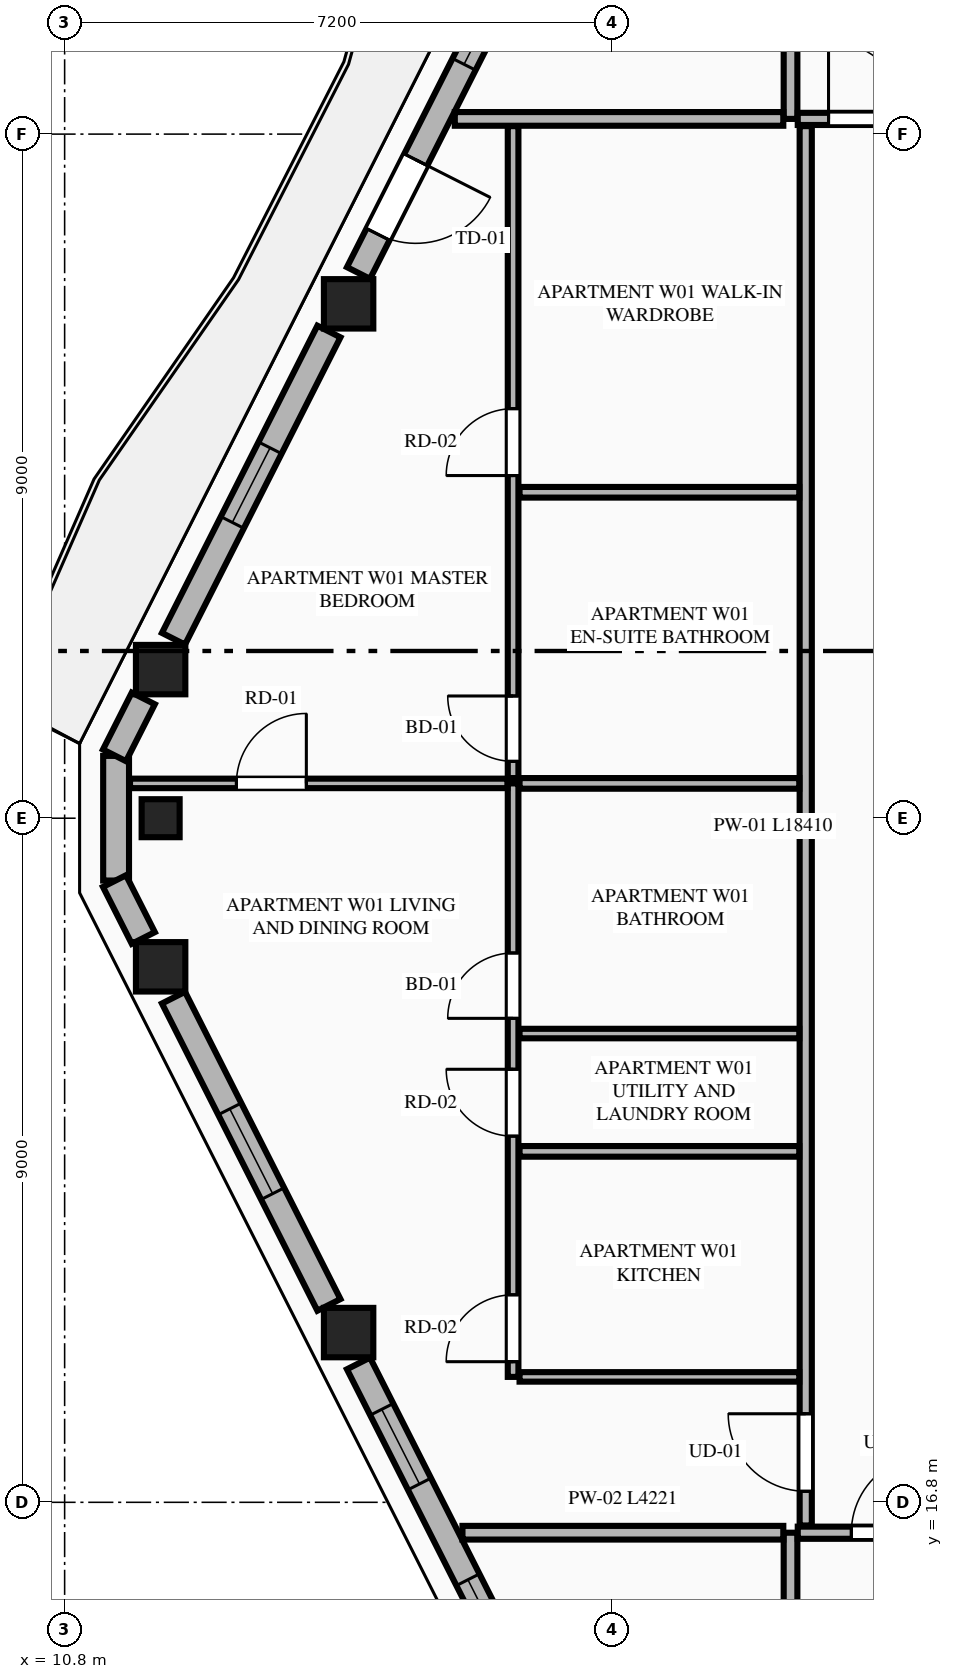
"""IFC4 building model, lengths in metres.
Left out: names, types, materials, properties, quantities, classifications, styles, units other than length and angle.
Written with IfcOpenShell. Run it as: python <this file> out.ifc"""

import sys

from ifc_helpers import new_model, si_unit, direction, frame, frame_2d, origin, origin_2d, place, context, subcontext, project, spatial, rectangle, extrude, element, fill, save


model = new_model("IFC4")
c1 = context("Model", 3, precision=1e-05, world=origin(), true_north=direction((0.0, 1.0)))
c2 = subcontext(c1, "Body", "Model", "MODEL_VIEW")
j1 = project(units=[si_unit("LENGTHUNIT", "METRE"), si_unit("PLANEANGLEUNIT", "RADIAN")], contexts=[c1])
p1 = place(None, origin())
s1 = spatial("IfcSite", under=j1, at=p1, CompositionType="ELEMENT")
p2 = place(p1, origin())
s2 = spatial("IfcBuilding", under=s1, at=p2, CompositionType="ELEMENT")
p3 = place(p2, frame((0.0, 0.0, 270.8)))
s3 = spatial("IfcBuildingStorey", under=s2, at=p3, CompositionType="ELEMENT", Elevation=270.8)
for number, where, z_axis, x_axis in (
    (1, (14.536, 32.567, 0.0), (0.0, 0.0, 1.0), (1.0, 0.0, 0.0)),
    (2, (12.063, 27.755, 0.0), (0.0, 0.0, 1.0), (1.0, 0.0, 0.0)),
    (3, (12.063, 23.845, 0.0), (0.0, 0.0, 1.0), (1.0, 0.0, 0.0)),
    (4, (14.536, 19.033, 0.0), (0.0, 0.0, 1.0), (1.0, 0.0, 0.0)),
):
    element("IfcColumn", number, at=place(p3, frame(where, z_axis=z_axis, x_axis=x_axis)), inside=s3, PredefinedType="COLUMN", context=c2, shape_type="SweptSolid", body=[
        extrude(rectangle(XDim=0.65, YDim=0.65, at=origin_2d()), origin(), (0.0, 0.0, 1.0), 3.65),
    ])
p4 = place(p3, frame((12.063, 25.8, 0.0), z_axis=(0.0, 0.0, 1.0), x_axis=(0.0, -1.0, 0.0)))
e5 = element("IfcColumn", 5, at=p4, inside=s3, PredefinedType="PILASTER", context=c2, shape_type="SweptSolid", body=[
    extrude(rectangle(XDim=0.5, YDim=0.35, at=origin_2d()), origin(), (0.0, 0.0, 1.0), 3.65),
])
p5 = place(p3, frame((11.477, 26.62, 0.0), z_axis=(0.0, 0.0, 1.0), x_axis=(0.0, -1.0, 0.0)))
e6 = element("IfcWall", 6, at=p5, inside=s3, PredefinedType="STANDARD", context=c2, shape_type="SweptSolid", body=[
    extrude(rectangle(XDim=1.64, YDim=0.34, at=frame_2d((0.82, 0.0))), origin(), (0.0, 0.0, 1.0), 3.45),
])
p6 = place(p3, frame((16.798, 37.187, 0.0), z_axis=(0.0, 0.0, 1.0), x_axis=(-0.451447516904, -0.892297674255, 0.0)))
e7 = element("IfcWall", 7, at=p6, inside=s3, PredefinedType="STANDARD", context=c2, shape_type="SweptSolid", body=[
    extrude(rectangle(XDim=4.723, YDim=0.34, at=frame_2d((2.361, 0.0))), origin(), (0.0, 0.0, 1.0), 2.983),
])
p7 = place(p6, frame((3.053, 0.0, 0.0)))
e8 = element("IfcOpeningElement", 8, at=p7, cuts=e7, PredefinedType="OPENING", context=c2, shape_type="SweptSolid", body=[
    extrude(rectangle(XDim=1.1, YDim=2.25, at=frame_2d((0.55, 1.125))), frame((0.0, 0.18, 0.0), z_axis=(0.0, -1.0, 0.0), x_axis=(1.0, 0.0, 0.0)), (0.0, 0.0, 1.0), 0.36),
])
p8 = place(p6, frame((0.546, 0.0, 0.75)))
e9 = element("IfcOpeningElement", 9, at=p8, cuts=e7, PredefinedType="OPENING", context=c2, shape_type="SweptSolid", body=[
    extrude(rectangle(XDim=1.1, YDim=2.0, at=frame_2d((0.55, 1.0))), frame((0.0, 0.18, 0.0), z_axis=(0.0, -1.0, 0.0), x_axis=(1.0, 0.0, 0.0)), (0.0, 0.0, 1.0), 0.36),
])
p9 = place(p3, frame((14.277, 32.203, 0.0), z_axis=(0.0, 0.0, 1.0), x_axis=(-0.45147697324, -0.892282770558, 0.0)))
e10 = element("IfcWall", 10, at=p9, inside=s3, PredefinedType="STANDARD", context=c2, shape_type="SweptSolid", body=[
    extrude(rectangle(XDim=4.53, YDim=0.34, at=frame_2d((2.265, 0.0))), origin(), (0.0, 0.0, 1.0), 2.983),
])
p10 = place(p9, frame((1.715, 0.0, 0.75)))
e11 = element("IfcOpeningElement", 11, at=p10, cuts=e10, PredefinedType="OPENING", context=c2, shape_type="SweptSolid", body=[
    extrude(rectangle(XDim=1.1, YDim=2.0, at=frame_2d((0.55, 1.0))), frame((0.0, 0.18, 0.0), z_axis=(0.0, -1.0, 0.0), x_axis=(1.0, 0.0, 0.0)), (0.0, 0.0, 1.0), 0.36),
])
p11 = place(p3, frame((11.835, 27.376, 0.0), z_axis=(0.0, 0.0, 1.0), x_axis=(-0.45139691133, -0.892323275748, 0.0)))
e12 = element("IfcWall", 12, at=p11, inside=s3, PredefinedType="STANDARD", context=c2, shape_type="SweptSolid", body=[
    extrude(rectangle(XDim=0.839, YDim=0.34, at=frame_2d((0.42, 0.0))), origin(), (0.0, 0.0, 1.0), 3.45),
])
p12 = place(p3, frame((11.456, 24.973, 0.0), z_axis=(0.0, 0.0, 1.0), x_axis=(0.4515140893, -0.892263989615, 0.0)))
e13 = element("IfcWall", 13, at=p12, inside=s3, PredefinedType="STANDARD", context=c2, shape_type="SweptSolid", body=[
    extrude(rectangle(XDim=0.839, YDim=0.34, at=frame_2d((0.419, 0.0))), origin(), (0.0, 0.0, 1.0), 3.45),
])
p13 = place(p3, frame((12.232, 23.439, 0.0), z_axis=(0.0, 0.0, 1.0), x_axis=(0.45147697324, -0.892282770558, 0.0)))
e14 = element("IfcWall", 14, at=p13, inside=s3, PredefinedType="STANDARD", context=c2, shape_type="SweptSolid", body=[
    extrude(rectangle(XDim=4.53, YDim=0.34, at=frame_2d((2.265, 0.0))), origin(), (0.0, 0.0, 1.0), 2.983),
])
p14 = place(p13, frame((1.64, 0.0, 0.75)))
e15 = element("IfcOpeningElement", 15, at=p14, cuts=e14, PredefinedType="OPENING", context=c2, shape_type="SweptSolid", body=[
    extrude(rectangle(XDim=1.25, YDim=1.95, at=frame_2d((0.625, 0.975))), frame((0.0, 0.18, 0.0), z_axis=(0.0, -1.0, 0.0), x_axis=(1.0, 0.0, 0.0)), (0.0, 0.0, 1.0), 0.36),
])
p15 = place(p3, frame((14.666, 18.627, 0.0), z_axis=(0.0, 0.0, 1.0), x_axis=(0.451468341582, -0.892287137949, 0.0)))
e16 = element("IfcWall", 16, at=p15, inside=s3, PredefinedType="STANDARD", context=c2, shape_type="SweptSolid", body=[
    extrude(rectangle(XDim=4.723, YDim=0.34, at=frame_2d((2.361, 0.0))), origin(), (0.0, 0.0, 1.0), 2.983),
])
p16 = place(p15, frame((0.677, 0.0, 0.75)))
e17 = element("IfcOpeningElement", 17, at=p16, cuts=e16, PredefinedType="OPENING", context=c2, shape_type="SweptSolid", body=[
    extrude(rectangle(XDim=1.1, YDim=2.0, at=frame_2d((0.55, 1.0))), frame((0.0, 0.18, 0.0), z_axis=(0.0, -1.0, 0.0), x_axis=(1.0, 0.0, 0.0)), (0.0, 0.0, 1.0), 0.36),
])
p17 = place(p15, frame((3.189, 0.0, 0.75)))
e18 = element("IfcOpeningElement", 18, at=p17, cuts=e16, PredefinedType="OPENING", context=c2, shape_type="SweptSolid", body=[
    extrude(rectangle(XDim=1.1, YDim=2.0, at=frame_2d((0.55, 1.0))), frame((0.0, 0.18, 0.0), z_axis=(0.0, -1.0, 0.0), x_axis=(1.0, 0.0, 0.0)), (0.0, 0.0, 1.0), 0.36),
])
p18 = place(p3, frame((20.35, 8.119, 0.0), z_axis=(0.0, 0.0, 1.0), x_axis=(0.0, 1.0, 0.0)))
e19 = element("IfcWall", 19, at=p18, inside=s3, PredefinedType="PARTITIONING", context=c2, shape_type="SweptSolid", body=[
    extrude(rectangle(XDim=8.281, YDim=0.18, at=frame_2d((4.141, 0.0))), origin(), (0.0, 0.0, 1.0), 3.45),
])
p19 = place(p3, frame((20.445, 16.4, 0.0), z_axis=(0.0, 0.0, 1.0), x_axis=(1.0, 0.0, 0.0)))
e20 = element("IfcWall", 20, at=p19, inside=s3, PredefinedType="PARTITIONING", context=c2, shape_type="SweptSolid", body=[
    extrude(rectangle(XDim=8.606, YDim=0.16, at=frame_2d((4.303, 0.0))), origin(), (0.0, 0.0, 1.0), 3.45),
])
p20 = place(p19, frame((0.705, 0.0, 0.0)))
e21 = element("IfcOpeningElement", 21, at=p20, cuts=e20, PredefinedType="OPENING", context=c2, shape_type="SweptSolid", body=[
    extrude(rectangle(XDim=1.02, YDim=2.25, at=frame_2d((0.51, 1.125))), frame((0.0, 0.09, 0.0), z_axis=(0.0, -1.0, 0.0), x_axis=(1.0, 0.0, 0.0)), (0.0, 0.0, 1.0), 0.18),
])
p21 = place(p3, frame((20.35, 35.0, 0.0), z_axis=(0.0, 0.0, 1.0), x_axis=(0.0, 1.0, 0.0)))
e22 = element("IfcWall", 22, at=p21, inside=s3, PredefinedType="PARTITIONING", context=c2, shape_type="SweptSolid", body=[
    extrude(rectangle(XDim=8.481, YDim=0.18, at=frame_2d((4.24, 0.0))), origin(), (0.0, 0.0, 1.0), 3.45),
])
p22 = place(p3, frame((20.445, 35.0, 0.0), z_axis=(0.0, 0.0, 1.0), x_axis=(1.0, 0.0, 0.0)))
e23 = element("IfcWall", 23, at=p22, inside=s3, PredefinedType="PARTITIONING", context=c2, shape_type="SweptSolid", body=[
    extrude(rectangle(XDim=15.114, YDim=0.16, at=frame_2d((7.557, 0.0))), origin(), (0.0, 0.0, 1.0), 3.45),
])
p23 = place(p22, frame((0.405, 0.0, 0.0)))
e24 = element("IfcOpeningElement", 24, at=p23, cuts=e23, PredefinedType="OPENING", context=c2, shape_type="SweptSolid", body=[
    extrude(rectangle(XDim=1.02, YDim=2.25, at=frame_2d((0.51, 1.125))), frame((0.0, 0.09, 0.0), z_axis=(0.0, -1.0, 0.0), x_axis=(1.0, 0.0, 0.0)), (0.0, 0.0, 1.0), 0.18),
])
p24 = place(p3, frame((16.034, 16.4, 0.0), z_axis=(0.0, 0.0, 1.0), x_axis=(1.0, 0.0, 0.0)))
e25 = element("IfcWall", 25, at=p24, inside=s3, PredefinedType="PARTITIONING", context=c2, shape_type="SweptSolid", body=[
    extrude(rectangle(XDim=4.221, YDim=0.18, at=frame_2d((2.11, 0.0))), origin(), (0.0, 0.0, 1.0), 3.45),
])
p25 = place(p3, frame((15.933, 35.0, 0.0), z_axis=(0.0, 0.0, 1.0), x_axis=(1.0, 0.0, 0.0)))
e26 = element("IfcWall", 26, at=p25, inside=s3, PredefinedType="PARTITIONING", context=c2, shape_type="SweptSolid", body=[
    extrude(rectangle(XDim=4.322, YDim=0.18, at=frame_2d((2.161, 0.0))), origin(), (0.0, 0.0, 1.0), 3.45),
])
p26 = place(p3, frame((20.55, 16.495, 0.0), z_axis=(0.0, 0.0, 1.0), x_axis=(0.0, 1.0, 0.0)))
e27 = element("IfcWall", 27, at=p26, inside=s3, PredefinedType="PARTITIONING", context=c2, shape_type="SweptSolid", body=[
    extrude(rectangle(XDim=18.41, YDim=0.16, at=frame_2d((9.205, 0.0))), origin(), (0.0, 0.0, 1.0), 3.137),
])
p27 = place(p26, frame((0.45, 0.0, 0.0)))
e28 = element("IfcOpeningElement", 28, at=p27, cuts=e27, PredefinedType="OPENING", context=c2, shape_type="SweptSolid", body=[
    extrude(rectangle(XDim=1.02, YDim=2.25, at=frame_2d((0.51, 1.125))), frame((0.0, 0.09, 0.0), z_axis=(0.0, -1.0, 0.0), x_axis=(1.0, 0.0, 0.0)), (0.0, 0.0, 1.0), 0.18),
])
p28 = place(p3, frame((16.785, 18.45, 0.0), z_axis=(0.0, 0.0, 1.0), x_axis=(1.0, 0.0, 0.0)))
e29 = element("IfcWall", 29, at=p28, inside=s3, PredefinedType="PARTITIONING", context=c2, shape_type="SweptSolid", body=[
    extrude(rectangle(XDim=3.68, YDim=0.125, at=frame_2d((1.84, 0.0))), origin(), (0.0, 0.0, 1.0), 3.45),
])
p29 = place(p3, frame((16.7, 18.45, 0.0), z_axis=(0.0, 0.0, 1.0), x_axis=(0.0, 1.0, 0.0)))
e30 = element("IfcWall", 30, at=p29, inside=s3, PredefinedType="PLUMBINGWALL", context=c2, shape_type="SweptSolid", body=[
    extrude(rectangle(XDim=7.808, YDim=0.14, at=frame_2d((3.904, 0.0))), origin(), (0.0, 0.0, 1.0), 3.45),
])
p30 = place(p29, frame((0.2, 0.0, 0.0)))
e31 = element("IfcOpeningElement", 31, at=p30, cuts=e30, PredefinedType="OPENING", context=c2, shape_type="SweptSolid", body=[
    extrude(rectangle(XDim=0.88, YDim=2.15, at=frame_2d((0.44, 1.075))), frame((0.0, 0.08, 0.0), z_axis=(0.0, -1.0, 0.0), x_axis=(1.0, 0.0, 0.0)), (0.0, 0.0, 1.0), 0.16),
])
p31 = place(p29, frame((3.167, 0.0, 0.0)))
e32 = element("IfcOpeningElement", 32, at=p31, cuts=e30, PredefinedType="OPENING", context=c2, shape_type="SweptSolid", body=[
    extrude(rectangle(XDim=0.88, YDim=2.15, at=frame_2d((0.44, 1.075))), frame((0.0, 0.08, 0.0), z_axis=(0.0, -1.0, 0.0), x_axis=(1.0, 0.0, 0.0)), (0.0, 0.0, 1.0), 0.16),
])
p32 = place(p29, frame((4.717, 0.0, 0.0)))
e33 = element("IfcOpeningElement", 33, at=p32, cuts=e30, PredefinedType="OPENING", context=c2, shape_type="SweptSolid", body=[
    extrude(rectangle(XDim=0.86, YDim=2.1, at=frame_2d((0.43, 1.05))), frame((0.0, 0.08, 0.0), z_axis=(0.0, -1.0, 0.0), x_axis=(1.0, 0.0, 0.0)), (0.0, 0.0, 1.0), 0.16),
])
p33 = place(p3, frame((16.7, 26.328, 0.0), z_axis=(0.0, 0.0, 1.0), x_axis=(0.0, 1.0, 0.0)))
e34 = element("IfcWall", 34, at=p33, inside=s3, PredefinedType="PLUMBINGWALL", context=c2, shape_type="SweptSolid", body=[
    extrude(rectangle(XDim=8.577, YDim=0.14, at=frame_2d((4.289, 0.0))), origin(), (0.0, 0.0, 1.0), 3.45),
])
p34 = place(p33, frame((0.22, 0.0, 0.0)))
e35 = element("IfcOpeningElement", 35, at=p34, cuts=e34, PredefinedType="OPENING", context=c2, shape_type="SweptSolid", body=[
    extrude(rectangle(XDim=0.86, YDim=2.1, at=frame_2d((0.43, 1.05))), frame((0.0, 0.08, 0.0), z_axis=(0.0, -1.0, 0.0), x_axis=(1.0, 0.0, 0.0)), (0.0, 0.0, 1.0), 0.16),
])
p35 = place(p33, frame((3.98, 0.0, 0.0)))
e36 = element("IfcOpeningElement", 36, at=p35, cuts=e34, PredefinedType="OPENING", context=c2, shape_type="SweptSolid", body=[
    extrude(rectangle(XDim=0.88, YDim=2.15, at=frame_2d((0.44, 1.075))), frame((0.0, 0.08, 0.0), z_axis=(0.0, -1.0, 0.0), x_axis=(1.0, 0.0, 0.0)), (0.0, 0.0, 1.0), 0.16),
])
p36 = place(p3, frame((16.785, 26.258, 0.0), z_axis=(0.0, 0.0, 1.0), x_axis=(1.0, 0.0, 0.0)))
e37 = element("IfcWall", 37, at=p36, inside=s3, PredefinedType="PLUMBINGWALL", context=c2, shape_type="SweptSolid", body=[
    extrude(rectangle(XDim=3.68, YDim=0.14, at=frame_2d((1.84, 0.0))), origin(), (0.0, 0.0, 1.0), 3.45),
])
p37 = place(p3, frame((11.66, 26.258, 0.0), z_axis=(0.0, 0.0, 1.0), x_axis=(1.0, 0.0, 0.0)))
e38 = element("IfcWall", 38, at=p37, inside=s3, PredefinedType="PARTITIONING", context=c2, shape_type="SweptSolid", body=[
    extrude(rectangle(XDim=4.965, YDim=0.125, at=frame_2d((2.482, 0.0))), origin(), (0.0, 0.0, 1.0), 3.45),
])
p38 = place(p37, frame((1.4, 0.0, 0.0)))
e39 = element("IfcOpeningElement", 39, at=p38, cuts=e38, PredefinedType="OPENING", context=c2, shape_type="SweptSolid", body=[
    extrude(rectangle(XDim=0.92, YDim=2.15, at=frame_2d((0.46, 1.075))), frame((0.0, 0.073, 0.0), z_axis=(0.0, -1.0, 0.0), x_axis=(1.0, 0.0, 0.0)), (0.0, 0.0, 1.0), 0.145),
])
p39 = place(p3, frame((16.785, 21.417, 0.0), z_axis=(0.0, 0.0, 1.0), x_axis=(1.0, 0.0, 0.0)))
e40 = element("IfcWall", 40, at=p39, inside=s3, PredefinedType="PLUMBINGWALL", context=c2, shape_type="SweptSolid", body=[
    extrude(rectangle(XDim=3.68, YDim=0.14, at=frame_2d((1.84, 0.0))), origin(), (0.0, 0.0, 1.0), 3.45),
])
p40 = place(p3, frame((16.785, 22.967, 0.0), z_axis=(0.0, 0.0, 1.0), x_axis=(1.0, 0.0, 0.0)))
e41 = element("IfcWall", 41, at=p40, inside=s3, PredefinedType="PARTITIONING", context=c2, shape_type="SweptSolid", body=[
    extrude(rectangle(XDim=3.68, YDim=0.125, at=frame_2d((1.84, 0.0))), origin(), (0.0, 0.0, 1.0), 3.45),
])
p41 = place(p3, frame((16.785, 30.088, 0.0), z_axis=(0.0, 0.0, 1.0), x_axis=(1.0, 0.0, 0.0)))
e42 = element("IfcWall", 42, at=p41, inside=s3, PredefinedType="PLUMBINGWALL", context=c2, shape_type="SweptSolid", body=[
    extrude(rectangle(XDim=3.68, YDim=0.14, at=frame_2d((1.84, 0.0))), origin(), (0.0, 0.0, 1.0), 3.45),
])
p42 = place(p7, origin())
e43 = element("IfcDoor", 43, at=p42, inside=s3, OperationType="SINGLE_SWING_LEFT", PredefinedType="DOOR", context=c2, shape_type="SweptSolid", body=[
    extrude(rectangle(XDim=1.1, YDim=2.25, at=frame_2d((0.55, 1.125))), frame((0.0, 0.025, 0.0), z_axis=(0.0, -1.0, 0.0), x_axis=(1.0, 0.0, 0.0)), (0.0, 0.0, 1.0), 0.05),
])
fill(e8, e43)
p43 = place(p10, origin())
e44 = element("IfcWindow", 44, at=p43, inside=s3, PartitioningType="SINGLE_PANEL", PredefinedType="WINDOW", context=c2, shape_type="SweptSolid", body=[
    extrude(rectangle(XDim=1.1, YDim=2.0, at=frame_2d((0.55, 1.0))), frame((0.0, 0.03, 0.0), z_axis=(0.0, -1.0, 0.0), x_axis=(1.0, 0.0, 0.0)), (0.0, 0.0, 1.0), 0.06),
])
fill(e11, e44)
p44 = place(p14, origin())
e45 = element("IfcWindow", 45, at=p44, inside=s3, PartitioningType="SINGLE_PANEL", PredefinedType="WINDOW", context=c2, shape_type="SweptSolid", body=[
    extrude(rectangle(XDim=1.25, YDim=1.95, at=frame_2d((0.625, 0.975))), frame((0.0, 0.03, 0.0), z_axis=(0.0, -1.0, 0.0), x_axis=(1.0, 0.0, 0.0)), (0.0, 0.0, 1.0), 0.06),
])
fill(e15, e45)
p45 = place(p16, origin())
e46 = element("IfcWindow", 46, at=p45, inside=s3, PartitioningType="SINGLE_PANEL", PredefinedType="WINDOW", context=c2, shape_type="SweptSolid", body=[
    extrude(rectangle(XDim=1.1, YDim=2.0, at=frame_2d((0.55, 1.0))), frame((0.0, 0.03, 0.0), z_axis=(0.0, -1.0, 0.0), x_axis=(1.0, 0.0, 0.0)), (0.0, 0.0, 1.0), 0.06),
])
fill(e17, e46)
p46 = place(p20, origin())
e47 = element("IfcDoor", 47, at=p46, inside=s3, OperationType="SINGLE_SWING_RIGHT", PredefinedType="DOOR", context=c2, shape_type="SweptSolid", body=[
    extrude(rectangle(XDim=1.02, YDim=2.25, at=frame_2d((0.51, 1.125))), frame((0.0, 0.025, 0.0), z_axis=(0.0, -1.0, 0.0), x_axis=(1.0, 0.0, 0.0)), (0.0, 0.0, 1.0), 0.05),
])
fill(e21, e47)
p47 = place(p23, origin())
e48 = element("IfcDoor", 48, at=p47, inside=s3, OperationType="SINGLE_SWING_LEFT", PredefinedType="DOOR", context=c2, shape_type="SweptSolid", body=[
    extrude(rectangle(XDim=1.02, YDim=2.25, at=frame_2d((0.51, 1.125))), frame((0.0, 0.025, 0.0), z_axis=(0.0, -1.0, 0.0), x_axis=(1.0, 0.0, 0.0)), (0.0, 0.0, 1.0), 0.05),
])
fill(e24, e48)
p48 = place(p30, origin())
e49 = element("IfcDoor", 49, at=p48, inside=s3, OperationType="SINGLE_SWING_LEFT", PredefinedType="DOOR", context=c2, shape_type="SweptSolid", body=[
    extrude(rectangle(XDim=0.88, YDim=2.15, at=frame_2d((0.44, 1.075))), frame((0.0, 0.025, 0.0), z_axis=(0.0, -1.0, 0.0), x_axis=(1.0, 0.0, 0.0)), (0.0, 0.0, 1.0), 0.05),
])
fill(e31, e49)
p49 = place(p31, origin())
e50 = element("IfcDoor", 50, at=p49, inside=s3, OperationType="SINGLE_SWING_RIGHT", PredefinedType="DOOR", context=c2, shape_type="SweptSolid", body=[
    extrude(rectangle(XDim=0.88, YDim=2.15, at=frame_2d((0.44, 1.075))), frame((0.0, 0.025, 0.0), z_axis=(0.0, -1.0, 0.0), x_axis=(1.0, 0.0, 0.0)), (0.0, 0.0, 1.0), 0.05),
])
fill(e32, e50)
p50 = place(p32, origin())
e51 = element("IfcDoor", 51, at=p50, inside=s3, OperationType="SINGLE_SWING_LEFT", PredefinedType="DOOR", context=c2, shape_type="SweptSolid", body=[
    extrude(rectangle(XDim=0.86, YDim=2.1, at=frame_2d((0.43, 1.05))), frame((0.0, 0.025, 0.0), z_axis=(0.0, -1.0, 0.0), x_axis=(1.0, 0.0, 0.0)), (0.0, 0.0, 1.0), 0.05),
])
fill(e33, e51)
p51 = place(p34, origin())
e52 = element("IfcDoor", 52, at=p51, inside=s3, OperationType="SINGLE_SWING_RIGHT", PredefinedType="DOOR", context=c2, shape_type="SweptSolid", body=[
    extrude(rectangle(XDim=0.86, YDim=2.1, at=frame_2d((0.43, 1.05))), frame((0.0, 0.025, 0.0), z_axis=(0.0, -1.0, 0.0), x_axis=(1.0, 0.0, 0.0)), (0.0, 0.0, 1.0), 0.05),
])
fill(e35, e52)
p52 = place(p35, origin())
e53 = element("IfcDoor", 53, at=p52, inside=s3, OperationType="SINGLE_SWING_LEFT", PredefinedType="DOOR", context=c2, shape_type="SweptSolid", body=[
    extrude(rectangle(XDim=0.88, YDim=2.15, at=frame_2d((0.44, 1.075))), frame((0.0, 0.025, 0.0), z_axis=(0.0, -1.0, 0.0), x_axis=(1.0, 0.0, 0.0)), (0.0, 0.0, 1.0), 0.05),
])
fill(e36, e53)
p53 = place(p27, origin())
e54 = element("IfcDoor", 54, at=p53, inside=s3, OperationType="SINGLE_SWING_RIGHT", PredefinedType="DOOR", context=c2, shape_type="SweptSolid", body=[
    extrude(rectangle(XDim=1.02, YDim=2.25, at=frame_2d((0.51, 1.125))), frame((0.0, 0.025, 0.0), z_axis=(0.0, -1.0, 0.0), x_axis=(1.0, 0.0, 0.0)), (0.0, 0.0, 1.0), 0.05),
])
fill(e28, e54)
p54 = place(p38, origin())
e55 = element("IfcDoor", 55, at=p54, inside=s3, OperationType="SINGLE_SWING_RIGHT", PredefinedType="DOOR", context=c2, shape_type="SweptSolid", body=[
    extrude(rectangle(XDim=0.92, YDim=2.15, at=frame_2d((0.46, 1.075))), frame((0.0, 0.025, 0.0), z_axis=(0.0, -1.0, 0.0), x_axis=(1.0, 0.0, 0.0)), (0.0, 0.0, 1.0), 0.05),
])
fill(e39, e55)
p55 = place(p8, origin())
e56 = element("IfcWindow", 56, at=p55, inside=s3, PartitioningType="SINGLE_PANEL", PredefinedType="WINDOW", context=c2, shape_type="SweptSolid", body=[
    extrude(rectangle(XDim=1.1, YDim=2.0, at=frame_2d((0.55, 1.0))), frame((0.0, 0.03, 0.0), z_axis=(0.0, -1.0, 0.0), x_axis=(1.0, 0.0, 0.0)), (0.0, 0.0, 1.0), 0.06),
])
fill(e9, e56)
p56 = place(p17, origin())
e57 = element("IfcWindow", 57, at=p56, inside=s3, PartitioningType="SINGLE_PANEL", PredefinedType="WINDOW", context=c2, shape_type="SweptSolid", body=[
    extrude(rectangle(XDim=1.1, YDim=2.0, at=frame_2d((0.55, 1.0))), frame((0.0, 0.03, 0.0), z_axis=(0.0, -1.0, 0.0), x_axis=(1.0, 0.0, 0.0)), (0.0, 0.0, 1.0), 0.06),
])
fill(e18, e57)
save(model, sys.argv[1])
